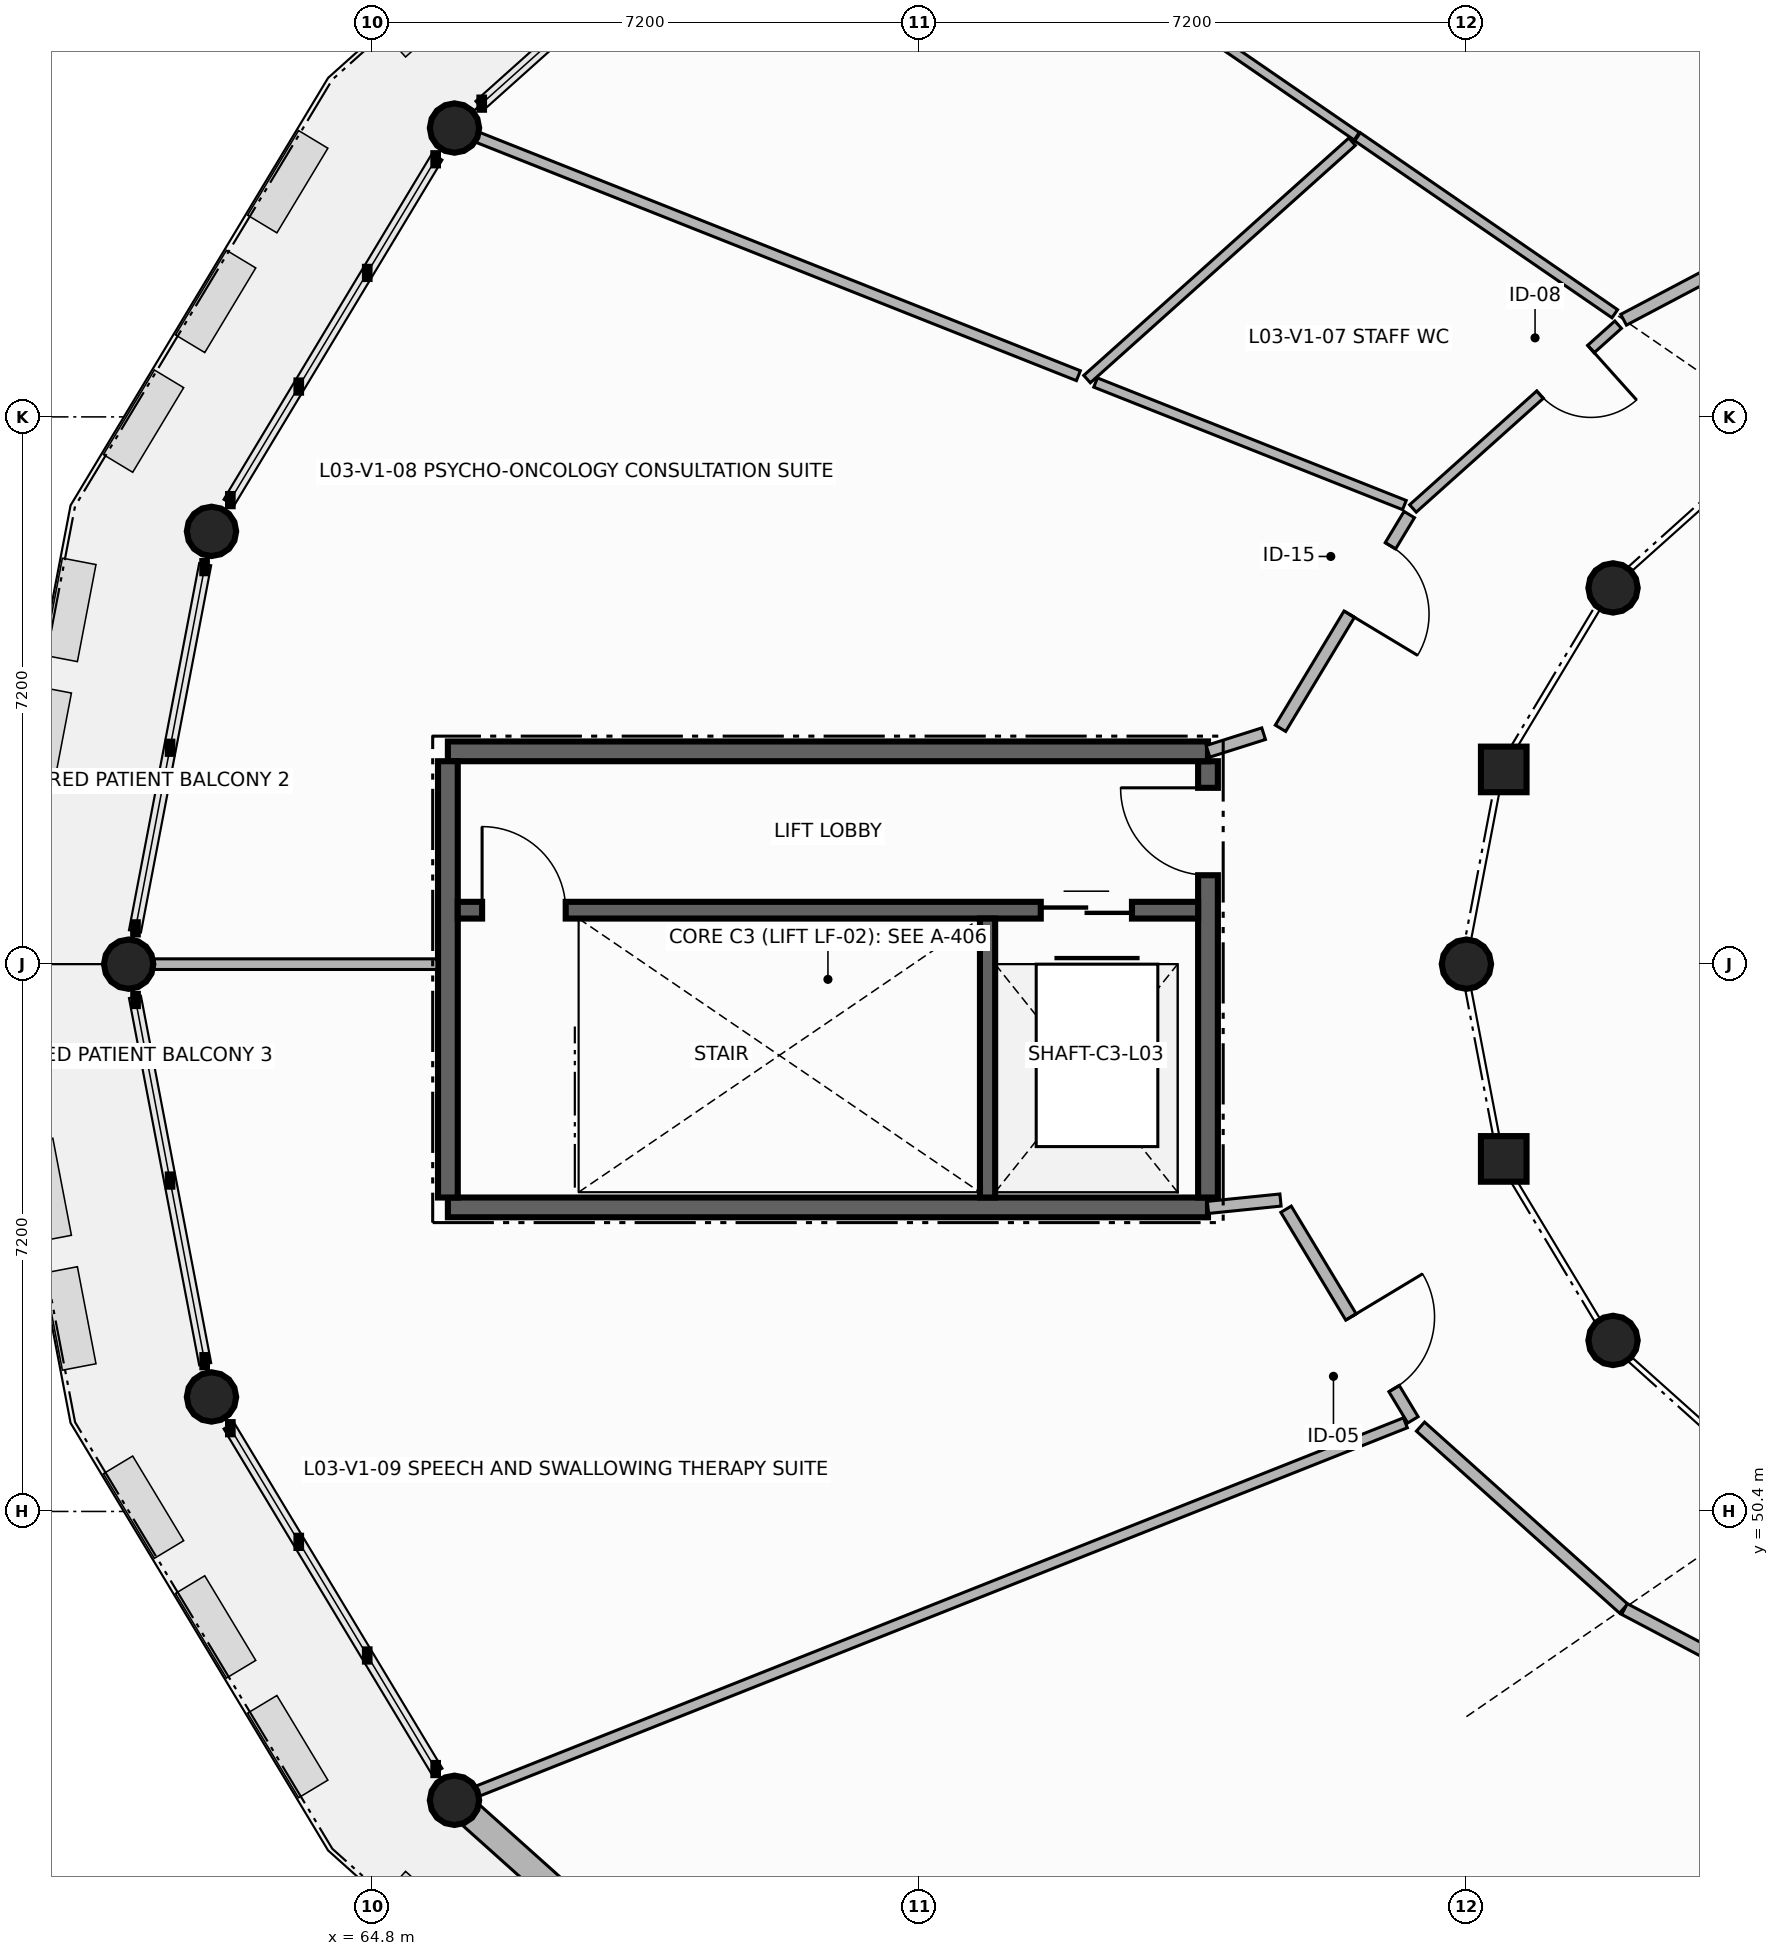
"""IFC4 building model, lengths in metres.
Left out: names, types, materials, properties, quantities, classifications, styles, units other than length and angle.
Written with IfcOpenShell. Run it as: python <this file> out.ifc"""

import sys

from ifc_helpers import new_model, si_unit, direction, frame, frame_2d, origin, origin_2d, place, context, subcontext, project, spatial, rectangle, circle, extrude, element, fill, save


model = new_model("IFC4")
c1 = context("Model", 3, precision=1e-05, world=origin(), true_north=direction((0.0, 1.0)))
c2 = subcontext(c1, "Body", "Model", "MODEL_VIEW")
j1 = project(units=[si_unit("LENGTHUNIT", "METRE"), si_unit("PLANEANGLEUNIT", "RADIAN")], contexts=[c1])
p1 = place(None, origin())
s1 = spatial("IfcSite", under=j1, at=p1, CompositionType="ELEMENT")
p2 = place(p1, origin())
s2 = spatial("IfcBuilding", under=s1, at=p2, CompositionType="ELEMENT")
p3 = place(p2, frame((0.0, 0.0, 12.3)))
s3 = spatial("IfcBuildingStorey", under=s2, at=p3, CompositionType="ELEMENT", Elevation=12.3)
for number, where, z_axis, x_axis in (
    (1, (65.887, 68.6, 0.0), (0.0, 0.0, 1.0), (1.0, 0.0, 0.0)),
    (2, (81.129, 62.55, 0.0), (0.0, 0.0, 1.0), (1.0, 0.0, 0.0)),
    (3, (62.69, 63.294, 0.0), (0.0, 0.0, 1.0), (1.0, 0.0, 0.0)),
):
    element("IfcColumn", number, at=place(p3, frame(where, z_axis=z_axis, x_axis=x_axis)), inside=s3, PredefinedType="COLUMN", context=c2, shape_type="SweptSolid", body=[
        extrude(circle(Radius=0.325, at=origin_2d()), origin(), (0.0, 0.0, 1.0), 3.7),
    ])
p4 = place(p3, frame((79.691, 60.162, 0.0), z_axis=(0.0, 0.0, 1.0), x_axis=(1.0, 0.0, 0.0)))
e4 = element("IfcColumn", 4, at=p4, inside=s3, PredefinedType="COLUMN", context=c2, shape_type="SweptSolid", body=[
    extrude(rectangle(XDim=0.6, YDim=0.6, at=origin_2d()), origin(), (0.0, 0.0, 1.0), 3.7),
])
for number, where, z_axis, x_axis in (
    (5, (61.6, 57.6, 0.0), (0.0, 0.0, 1.0), (1.0, 0.0, 0.0)),
    (6, (79.2, 57.6, 0.0), (0.0, 0.0, 1.0), (1.0, 0.0, 0.0)),
    (7, (62.69, 51.906, 0.0), (0.0, 0.0, 1.0), (1.0, 0.0, 0.0)),
):
    element("IfcColumn", number, at=place(p3, frame(where, z_axis=z_axis, x_axis=x_axis)), inside=s3, PredefinedType="COLUMN", context=c2, shape_type="SweptSolid", body=[
        extrude(circle(Radius=0.325, at=origin_2d()), origin(), (0.0, 0.0, 1.0), 3.7),
    ])
p5 = place(p3, frame((79.691, 55.038, 0.0), z_axis=(0.0, 0.0, 1.0), x_axis=(1.0, 0.0, 0.0)))
e8 = element("IfcColumn", 8, at=p5, inside=s3, PredefinedType="COLUMN", context=c2, shape_type="SweptSolid", body=[
    extrude(rectangle(XDim=0.6, YDim=0.6, at=origin_2d()), origin(), (0.0, 0.0, 1.0), 3.7),
])
for number, where, z_axis, x_axis in (
    (9, (65.887, 46.6, 0.0), (0.0, 0.0, 1.0), (1.0, 0.0, 0.0)),
    (10, (81.129, 52.65, 0.0), (0.0, 0.0, 1.0), (1.0, 0.0, 0.0)),
):
    element("IfcColumn", number, at=place(p3, frame(where, z_axis=z_axis, x_axis=x_axis)), inside=s3, PredefinedType="COLUMN", context=c2, shape_type="SweptSolid", body=[
        extrude(circle(Radius=0.325, at=origin_2d()), origin(), (0.0, 0.0, 1.0), 3.7),
    ])
p6 = place(p3, frame((65.887, 46.6, 0.0), z_axis=(0.0, 0.0, 1.0), x_axis=(0.744835335723, -0.667248321585, 0.0)))
e11 = element("IfcWall", 11, at=p6, inside=s3, PredefinedType="SOLIDWALL", context=c2, shape_type="SweptSolid", body=[
    extrude(rectangle(XDim=6.828, YDim=0.35, at=frame_2d((3.414, 0.0))), origin(), (0.0, 0.0, 1.0), 2.85),
])
p7 = place(p6, frame((2.814, 0.0, 0.0)))
e12 = element("IfcOpeningElement", 12, at=p7, cuts=e11, PredefinedType="OPENING", context=c2, shape_type="SweptSolid", body=[
    extrude(rectangle(XDim=1.2, YDim=2.3, at=frame_2d((0.6, 1.15))), frame((0.0, 0.185, 0.0), z_axis=(0.0, -1.0, 0.0), x_axis=(1.0, 0.0, 0.0)), (0.0, 0.0, 1.0), 0.37),
])
p8 = place(p3, frame((65.8, 54.4, 0.0), z_axis=(0.0, 0.0, 1.0), x_axis=(1.0, 0.0, 0.0)))
e13 = element("IfcWall", 13, at=p8, inside=s3, PredefinedType="SHEAR", context=c2, shape_type="SweptSolid", body=[
    extrude(rectangle(XDim=10.0, YDim=0.26, at=frame_2d((5.0, 0.0))), origin(), (0.0, 0.0, 1.0), 3.5),
])
p9 = place(p3, frame((75.8, 54.53, 0.0), z_axis=(0.0, 0.0, 1.0), x_axis=(0.0, 1.0, 0.0)))
e14 = element("IfcWall", 14, at=p9, inside=s3, PredefinedType="SHEAR", context=c2, shape_type="SweptSolid", body=[
    extrude(rectangle(XDim=5.74, YDim=0.26, at=frame_2d((2.87, 0.0))), origin(), (0.0, 0.0, 1.0), 3.5),
])
p10 = place(p9, frame((4.24, 0.0, 0.0)))
e15 = element("IfcOpeningElement", 15, at=p10, cuts=e14, PredefinedType="OPENING", context=c2, shape_type="SweptSolid", body=[
    extrude(rectangle(XDim=1.15, YDim=2.2, at=frame_2d((0.575, 1.1))), frame((0.0, 0.14, 0.0), z_axis=(0.0, -1.0, 0.0), x_axis=(1.0, 0.0, 0.0)), (0.0, 0.0, 1.0), 0.28),
])
p11 = place(p3, frame((75.8, 60.4, 0.0), z_axis=(0.0, 0.0, 1.0), x_axis=(-1.0, 0.0, 0.0)))
e16 = element("IfcWall", 16, at=p11, inside=s3, PredefinedType="SHEAR", context=c2, shape_type="SweptSolid", body=[
    extrude(rectangle(XDim=10.0, YDim=0.26, at=frame_2d((5.0, 0.0))), origin(), (0.0, 0.0, 1.0), 3.5),
])
p12 = place(p3, frame((65.8, 60.27, 0.0), z_axis=(0.0, 0.0, 1.0), x_axis=(0.0, -1.0, 0.0)))
e17 = element("IfcWall", 17, at=p12, inside=s3, PredefinedType="SHEAR", context=c2, shape_type="SweptSolid", body=[
    extrude(rectangle(XDim=5.74, YDim=0.26, at=frame_2d((2.87, 0.0))), origin(), (0.0, 0.0, 1.0), 3.5),
])
p13 = place(p3, frame((65.93, 58.31, 0.0), z_axis=(0.0, 0.0, 1.0), x_axis=(1.0, 0.0, 0.0)))
e18 = element("IfcWall", 18, at=p13, inside=s3, PredefinedType="SHEAR", context=c2, shape_type="SweptSolid", body=[
    extrude(rectangle(XDim=9.74, YDim=0.22, at=frame_2d((4.87, 0.0))), origin(), (0.0, 0.0, 1.0), 3.5),
])
p14 = place(p13, frame((0.32, 0.0, 0.0)))
e19 = element("IfcOpeningElement", 19, at=p14, cuts=e18, PredefinedType="OPENING", context=c2, shape_type="SweptSolid", body=[
    extrude(rectangle(XDim=1.1, YDim=2.15, at=frame_2d((0.55, 1.075))), frame((0.0, 0.12, 0.0), z_axis=(0.0, -1.0, 0.0), x_axis=(1.0, 0.0, 0.0)), (0.0, 0.0, 1.0), 0.24),
])
p15 = place(p13, frame((7.67, 0.0, 0.0)))
e20 = element("IfcOpeningElement", 20, at=p15, cuts=e18, PredefinedType="OPENING", context=c2, shape_type="SweptSolid", body=[
    extrude(rectangle(XDim=1.2, YDim=2.2, at=frame_2d((0.6, 1.1))), frame((0.0, 0.12, 0.0), z_axis=(0.0, -1.0, 0.0), x_axis=(1.0, 0.0, 0.0)), (0.0, 0.0, 1.0), 0.24),
])
p16 = place(p3, frame((72.9, 54.53, 0.0), z_axis=(0.0, 0.0, 1.0), x_axis=(0.0, 1.0, 0.0)))
e21 = element("IfcWall", 21, at=p16, inside=s3, PredefinedType="SHEAR", context=c2, shape_type="SweptSolid", body=[
    extrude(rectangle(XDim=3.67, YDim=0.2, at=frame_2d((1.835, 0.0))), origin(), (0.0, 0.0, 1.0), 3.5),
])
p17 = place(p3, frame((84.794, 68.087, 0.0), z_axis=(0.0, 0.0, 1.0), x_axis=(-0.643158316092, 0.765733230598, 0.0)))
e22 = element("IfcWall", 22, at=p17, inside=s3, PredefinedType="PARTITIONING", context=c2, shape_type="SweptSolid", body=[
    extrude(rectangle(XDim=10.851, YDim=0.14, at=frame_2d((5.426, 0.0))), origin(), (0.0, 0.0, 1.0), 2.82),
])
p18 = place(p3, frame((84.789, 67.936, 0.0), z_axis=(0.0, 0.0, 1.0), x_axis=(-0.884400221891, -0.466729308613, 0.0)))
e23 = element("IfcWall", 23, at=p18, inside=s3, PredefinedType="PARTITIONING", context=c2, shape_type="SweptSolid", body=[
    extrude(rectangle(XDim=3.981, YDim=0.16, at=frame_2d((1.991, 0.0))), origin(), (0.0, 0.0, 1.0), 2.82),
])
p19 = place(p18, frame((0.48, 0.0, 0.0)))
e24 = element("IfcOpeningElement", 24, at=p19, cuts=e23, PredefinedType="OPENING", context=c2, shape_type="SweptSolid", body=[
    extrude(rectangle(XDim=1.3, YDim=2.25, at=frame_2d((0.65, 1.125))), frame((0.0, 0.09, 0.0), z_axis=(0.0, -1.0, 0.0), x_axis=(1.0, 0.0, 0.0)), (0.0, 0.0, 1.0), 0.18),
])
p20 = place(p3, frame((81.152, 66.157, 0.0), z_axis=(0.0, 0.0, 1.0), x_axis=(-0.823936141703, 0.566682657575, 0.0)))
e25 = element("IfcWall", 25, at=p20, inside=s3, PredefinedType="PARTITIONING", context=c2, shape_type="SweptSolid", body=[
    extrude(rectangle(XDim=4.108, YDim=0.13, at=frame_2d((2.054, 0.0))), origin(), (0.0, 0.0, 1.0), 2.82),
])
p21 = place(p3, frame((77.757, 68.492, 0.0), z_axis=(0.0, 0.0, 1.0), x_axis=(-0.8240518458, 0.566514391197, 0.0)))
e26 = element("IfcWall", 26, at=p21, inside=s3, PredefinedType="PARTITIONING", context=c2, shape_type="SweptSolid", body=[
    extrude(rectangle(XDim=7.898, YDim=0.12, at=frame_2d((3.949, 0.0))), origin(), (0.0, 0.0, 1.0), 2.82),
])
p22 = place(p3, frame((74.209, 65.297, 0.0), z_axis=(0.0, 0.0, 1.0), x_axis=(0.744943870086, 0.667127147117, 0.0)))
e27 = element("IfcWall", 27, at=p22, inside=s3, PredefinedType="PARTITIONING", context=c2, shape_type="SweptSolid", body=[
    extrude(rectangle(XDim=4.681, YDim=0.13, at=frame_2d((2.34, 0.0))), origin(), (0.0, 0.0, 1.0), 2.82),
])
p23 = place(p3, frame((81.196, 66.013, 0.0), z_axis=(0.0, 0.0, 1.0), x_axis=(-0.744936456677, -0.667135425168, 0.0)))
e28 = element("IfcWall", 28, at=p23, inside=s3, PredefinedType="PARTITIONING", context=c2, shape_type="SweptSolid", body=[
    extrude(rectangle(XDim=3.625, YDim=0.13, at=frame_2d((1.812, 0.0))), origin(), (0.0, 0.0, 1.0), 2.82),
])
p24 = place(p23, frame((0.48, 0.0, 0.0)))
e29 = element("IfcOpeningElement", 29, at=p24, cuts=e28, PredefinedType="OPENING", context=c2, shape_type="SweptSolid", body=[
    extrude(rectangle(XDim=0.9, YDim=2.1, at=frame_2d((0.45, 1.05))), frame((0.0, 0.075, 0.0), z_axis=(0.0, -1.0, 0.0), x_axis=(1.0, 0.0, 0.0)), (0.0, 0.0, 1.0), 0.15),
])
p25 = place(p3, frame((78.384, 63.64, 0.0), z_axis=(0.0, 0.0, 1.0), x_axis=(-0.929509250735, 0.368798797176, 0.0)))
e30 = element("IfcWall", 30, at=p25, inside=s3, PredefinedType="PARTITIONING", context=c2, shape_type="SweptSolid", body=[
    extrude(rectangle(XDim=4.371, YDim=0.13, at=frame_2d((2.186, 0.0))), origin(), (0.0, 0.0, 1.0), 2.82),
])
p26 = place(p3, frame((65.655, 57.6, 0.0), z_axis=(0.0, 0.0, 1.0), x_axis=(-1.0, 0.0, 0.0)))
e31 = element("IfcWall", 31, at=p26, inside=s3, PredefinedType="PARTITIONING", context=c2, shape_type="SweptSolid", body=[
    extrude(rectangle(XDim=3.72, YDim=0.14, at=frame_2d((1.86, 0.0))), origin(), (0.0, 0.0, 1.0), 2.82),
])
p27 = place(p3, frame((66.198, 68.476, 0.0), z_axis=(0.0, 0.0, 1.0), x_axis=(0.929478044239, -0.368877439371, 0.0)))
e32 = element("IfcWall", 32, at=p27, inside=s3, PredefinedType="PARTITIONING", context=c2, shape_type="SweptSolid", body=[
    extrude(rectangle(XDim=8.496, YDim=0.14, at=frame_2d((4.248, 0.0))), origin(), (0.0, 0.0, 1.0), 2.82),
])
p28 = place(p3, frame((78.448, 63.515, 0.0), z_axis=(0.0, 0.0, 1.0), x_axis=(-0.516036958114, -0.856566318425, 0.0)))
e33 = element("IfcWall", 33, at=p28, inside=s3, PredefinedType="PARTITIONING", context=c2, shape_type="SweptSolid", body=[
    extrude(rectangle(XDim=3.283, YDim=0.16, at=frame_2d((1.642, 0.0))), origin(), (0.0, 0.0, 1.0), 2.82),
])
p29 = place(p28, frame((0.48, 0.0, 0.0)))
e34 = element("IfcOpeningElement", 34, at=p29, cuts=e33, PredefinedType="OPENING", context=c2, shape_type="SweptSolid", body=[
    extrude(rectangle(XDim=1.05, YDim=2.2, at=frame_2d((0.525, 1.1))), frame((0.0, 0.09, 0.0), z_axis=(0.0, -1.0, 0.0), x_axis=(1.0, 0.0, 0.0)), (0.0, 0.0, 1.0), 0.18),
])
p30 = place(p3, frame((76.532, 60.632, 0.0), z_axis=(0.0, 0.0, 1.0), x_axis=(-0.953192648892, -0.302363645463, 0.0)))
e35 = element("IfcWall", 35, at=p30, inside=s3, PredefinedType="PARTITIONING", context=c2, shape_type="SweptSolid", body=[
    extrude(rectangle(XDim=0.768, YDim=0.16, at=frame_2d((0.384, 0.0))), origin(), (0.0, 0.0, 1.0), 2.82),
])
p31 = place(p3, frame((75.8, 54.4, 0.0), z_axis=(0.0, 0.0, 1.0), x_axis=(0.994851446462, 0.101343966136, 0.0)))
e36 = element("IfcWall", 36, at=p31, inside=s3, PredefinedType="PARTITIONING", context=c2, shape_type="SweptSolid", body=[
    extrude(rectangle(XDim=0.959, YDim=0.16, at=frame_2d((0.479, 0.0))), origin(), (0.0, 0.0, 1.0), 2.82),
])
p32 = place(p3, frame((76.827, 54.376, 0.0), z_axis=(0.0, 0.0, 1.0), x_axis=(0.515993285702, -0.85659262728, 0.0)))
e37 = element("IfcWall", 37, at=p32, inside=s3, PredefinedType="PARTITIONING", context=c2, shape_type="SweptSolid", body=[
    extrude(rectangle(XDim=3.235, YDim=0.16, at=frame_2d((1.617, 0.0))), origin(), (0.0, 0.0, 1.0), 2.82),
])
p33 = place(p32, frame((1.655, 0.0, 0.0)))
e38 = element("IfcOpeningElement", 38, at=p33, cuts=e37, PredefinedType="OPENING", context=c2, shape_type="SweptSolid", body=[
    extrude(rectangle(XDim=1.1, YDim=2.2, at=frame_2d((0.55, 1.1))), frame((0.0, 0.09, 0.0), z_axis=(0.0, -1.0, 0.0), x_axis=(1.0, 0.0, 0.0)), (0.0, 0.0, 1.0), 0.18),
])
p34 = place(p3, frame((78.397, 51.566, 0.0), z_axis=(0.0, 0.0, 1.0), x_axis=(-0.929434419676, -0.368987343309, 0.0)))
e39 = element("IfcWall", 39, at=p34, inside=s3, PredefinedType="PARTITIONING", context=c2, shape_type="SweptSolid", body=[
    extrude(rectangle(XDim=13.125, YDim=0.14, at=frame_2d((6.562, 0.0))), origin(), (0.0, 0.0, 1.0), 2.82),
])
p35 = place(p3, frame((78.596, 51.516, 0.0), z_axis=(0.0, 0.0, 1.0), x_axis=(0.744797991907, -0.667290005358, 0.0)))
e40 = element("IfcWall", 40, at=p35, inside=s3, PredefinedType="PARTITIONING", context=c2, shape_type="SweptSolid", body=[
    extrude(rectangle(XDim=3.588, YDim=0.16, at=frame_2d((1.794, 0.0))), origin(), (0.0, 0.0, 1.0), 2.82),
])
p36 = place(p3, frame((81.279, 49.116, 0.0), z_axis=(0.0, 0.0, 1.0), x_axis=(0.884439067329, -0.4666556934, 0.0)))
e41 = element("IfcWall", 41, at=p36, inside=s3, PredefinedType="PARTITIONING", context=c2, shape_type="SweptSolid", body=[
    extrude(rectangle(XDim=4.071, YDim=0.16, at=frame_2d((2.036, 0.0))), origin(), (0.0, 0.0, 1.0), 2.82),
])
p37 = place(p36, frame((2.29, 0.0, 0.0)))
e42 = element("IfcOpeningElement", 42, at=p37, cuts=e41, PredefinedType="OPENING", context=c2, shape_type="SweptSolid", body=[
    extrude(rectangle(XDim=1.1, YDim=2.2, at=frame_2d((0.55, 1.1))), frame((0.0, 0.09, 0.0), z_axis=(0.0, -1.0, 0.0), x_axis=(1.0, 0.0, 0.0)), (0.0, 0.0, 1.0), 0.18),
])
p38 = place(p3, frame((84.808, 47.131, 0.0), z_axis=(0.0, 0.0, 1.0), x_axis=(-0.643103623671, -0.765779164787, 0.0)))
e43 = element("IfcWall", 43, at=p38, inside=s3, PredefinedType="PARTITIONING", context=c2, shape_type="SweptSolid", body=[
    extrude(rectangle(XDim=10.874, YDim=0.14, at=frame_2d((5.437, 0.0))), origin(), (0.0, 0.0, 1.0), 2.82),
])
p39 = place(p14, origin())
e44 = element("IfcDoor", 44, at=p39, inside=s3, OperationType="SINGLE_SWING_LEFT", PredefinedType="DOOR", context=c2, shape_type="SweptSolid", body=[
    extrude(rectangle(XDim=1.1, YDim=2.15, at=frame_2d((0.55, 1.075))), frame((0.0, 0.025, 0.0), z_axis=(0.0, -1.0, 0.0), x_axis=(1.0, 0.0, 0.0)), (0.0, 0.0, 1.0), 0.05),
])
fill(e19, e44)
p40 = place(p15, origin())
e45 = element("IfcDoor", 45, at=p40, inside=s3, OperationType="DOUBLE_DOOR_SLIDING", PredefinedType="DOOR", context=c2, shape_type="SweptSolid", body=[
    extrude(rectangle(XDim=1.2, YDim=2.2, at=frame_2d((0.6, 1.1))), frame((0.0, 0.025, 0.0), z_axis=(0.0, -1.0, 0.0), x_axis=(1.0, 0.0, 0.0)), (0.0, 0.0, 1.0), 0.05),
])
fill(e20, e45)
p41 = place(p10, origin())
e46 = element("IfcDoor", 46, at=p41, inside=s3, OperationType="SINGLE_SWING_RIGHT", PredefinedType="DOOR", context=c2, shape_type="SweptSolid", body=[
    extrude(rectangle(XDim=1.15, YDim=2.2, at=frame_2d((0.575, 1.1))), frame((0.0, 0.025, 0.0), z_axis=(0.0, -1.0, 0.0), x_axis=(1.0, 0.0, 0.0)), (0.0, 0.0, 1.0), 0.05),
])
fill(e15, e46)
p42 = place(p24, origin())
e47 = element("IfcDoor", 47, at=p42, inside=s3, OperationType="SINGLE_SWING_LEFT", PredefinedType="DOOR", context=c2, shape_type="SweptSolid", body=[
    extrude(rectangle(XDim=0.9, YDim=2.1, at=frame_2d((0.45, 1.05))), frame((0.0, 0.025, 0.0), z_axis=(0.0, -1.0, 0.0), x_axis=(1.0, 0.0, 0.0)), (0.0, 0.0, 1.0), 0.05),
])
fill(e29, e47)
p43 = place(p29, origin())
e48 = element("IfcDoor", 48, at=p43, inside=s3, OperationType="SINGLE_SWING_RIGHT", PredefinedType="DOOR", context=c2, shape_type="SweptSolid", body=[
    extrude(rectangle(XDim=1.05, YDim=2.2, at=frame_2d((0.525, 1.1))), frame((0.0, 0.025, 0.0), z_axis=(0.0, -1.0, 0.0), x_axis=(1.0, 0.0, 0.0)), (0.0, 0.0, 1.0), 0.05),
])
fill(e34, e48)
p44 = place(p33, origin())
e49 = element("IfcDoor", 49, at=p44, inside=s3, OperationType="SINGLE_SWING_LEFT", PredefinedType="DOOR", context=c2, shape_type="SweptSolid", body=[
    extrude(rectangle(XDim=1.1, YDim=2.2, at=frame_2d((0.55, 1.1))), frame((0.0, 0.025, 0.0), z_axis=(0.0, -1.0, 0.0), x_axis=(1.0, 0.0, 0.0)), (0.0, 0.0, 1.0), 0.05),
])
fill(e38, e49)
save(model, sys.argv[1])
